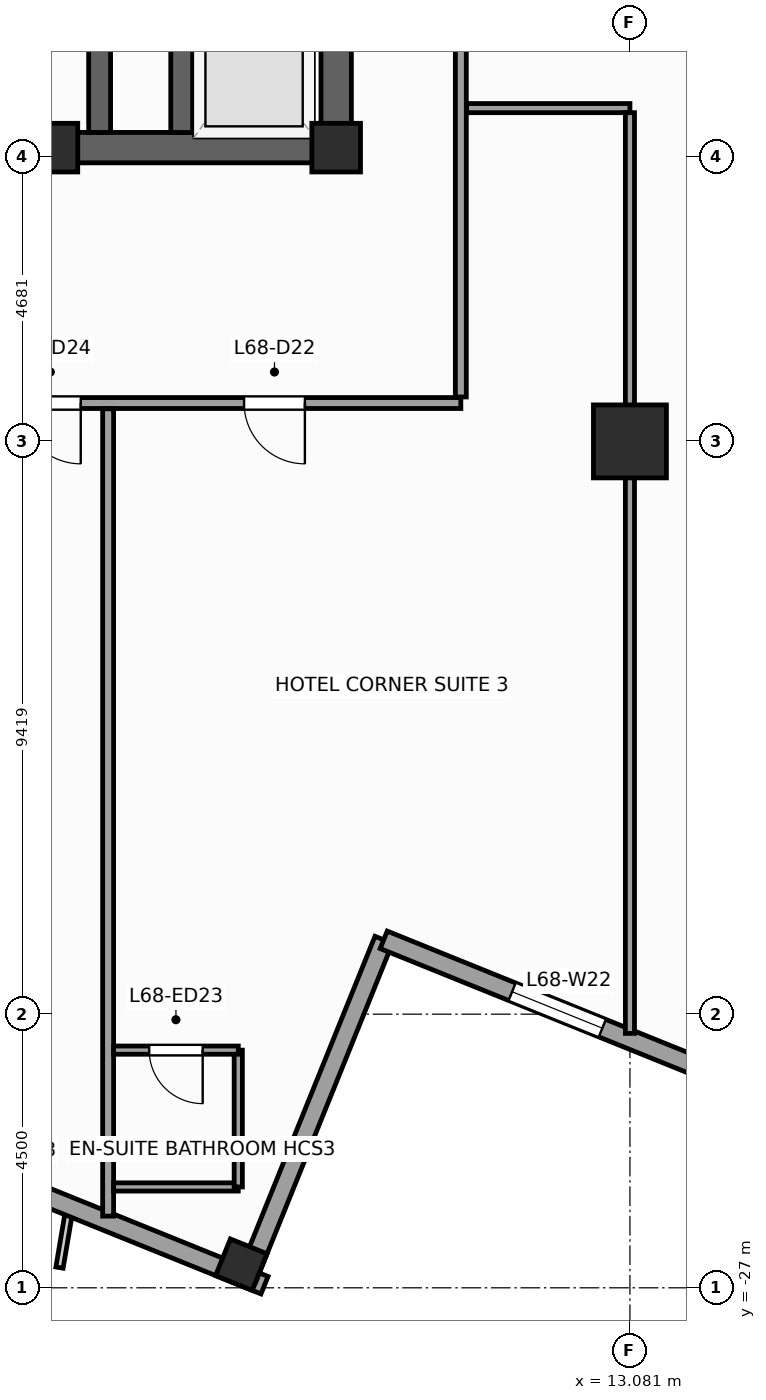
"""IFC4 building model, lengths in metres.
Left out: names, types, materials, properties, quantities, classifications, styles, units other than length and angle.
Written with IfcOpenShell. Run it as: python <this file> out.ifc"""

import sys

from ifc_helpers import new_model, si_unit, direction, frame, frame_2d, origin, origin_2d, place, context, subcontext, project, spatial, rectangle, extrude, source, transform, mapped, element, fill, save


model = new_model("IFC4")
c1 = context("Model", 3, precision=1e-05, world=origin(), true_north=direction((0.0, 1.0)))
c2 = subcontext(c1, "Body", "Model", "MODEL_VIEW")
j1 = project(units=[si_unit("LENGTHUNIT", "METRE"), si_unit("PLANEANGLEUNIT", "RADIAN")], contexts=[c1])
p1 = place(None, origin())
s1 = spatial("IfcSite", under=j1, at=p1, CompositionType="ELEMENT")
p2 = place(p1, origin())
s2 = spatial("IfcBuilding", under=s1, at=p2, CompositionType="ELEMENT")
p3 = place(p2, frame((0.0, 0.0, 279.6)))
s3 = spatial("IfcBuildingStorey", under=s2, at=p3, CompositionType="ELEMENT", Elevation=279.6)
p4 = place(p3, frame((-8.5, -8.25, 0.0), z_axis=(0.0, 0.0, 1.0), x_axis=(1.0, 0.0, 0.0)))
e1 = element("IfcWall", 1, at=p4, inside=s3, PredefinedType="SHEAR", context=c2, shape_type="SweptSolid", body=[
    extrude(rectangle(XDim=17.0, YDim=0.5, at=frame_2d((8.5, 0.0))), origin(), (0.0, 0.0, 1.0), 3.6),
])
p5 = place(p4, frame((7.85, 0.0, 0.0)))
e2 = element("IfcOpeningElement", 2, at=p5, cuts=e1, PredefinedType="OPENING", context=c2, shape_type="SweptSolid", body=[
    extrude(rectangle(XDim=1.3, YDim=2.2, at=frame_2d((0.65, 1.1))), frame((0.0, 0.26, 0.0), z_axis=(0.0, -1.0, 0.0), x_axis=(1.0, 0.0, 0.0)), (0.0, 0.0, 1.0), 0.52),
])
p6 = place(p3, frame((8.25, -8.0, 0.0), z_axis=(0.0, 0.0, 1.0), x_axis=(0.0, 1.0, 0.0)))
e3 = element("IfcWall", 3, at=p6, inside=s3, PredefinedType="SHEAR", context=c2, shape_type="SweptSolid", body=[
    extrude(rectangle(XDim=16.0, YDim=0.5, at=frame_2d((8.0, 0.0))), origin(), (0.0, 0.0, 1.0), 3.6),
])
p7 = place(p6, frame((4.69, 0.0, 0.0)))
e4 = element("IfcOpeningElement", 4, at=p7, cuts=e3, PredefinedType="OPENING", context=c2, shape_type="SweptSolid", body=[
    extrude(rectangle(XDim=1.3, YDim=2.2, at=frame_2d((0.65, 1.1))), frame((0.0, 0.26, 0.0), z_axis=(0.0, -1.0, 0.0), x_axis=(1.0, 0.0, 0.0)), (0.0, 0.0, 1.0), 0.52),
])
p8 = place(p3, frame((4.36, -8.0, 0.0), z_axis=(0.0, 0.0, 1.0), x_axis=(0.0, 1.0, 0.0)))
e5 = element("IfcWall", 5, at=p8, inside=s3, PredefinedType="SHEAR", context=c2, shape_type="SweptSolid", body=[
    extrude(rectangle(XDim=16.0, YDim=0.36, at=frame_2d((8.0, 0.0))), origin(), (0.0, 0.0, 1.0), 3.6),
])
p9 = place(p3, frame((5.71, -8.0, 0.0), z_axis=(0.0, 0.0, 1.0), x_axis=(0.0, 1.0, 0.0)))
e6 = element("IfcWall", 6, at=p9, inside=s3, PredefinedType="SHEAR", context=c2, shape_type="SweptSolid", body=[
    extrude(rectangle(XDim=2.54, YDim=0.36, at=frame_2d((1.27, 0.0))), origin(), (0.0, 0.0, 1.0), 3.6),
])
m1 = source(origin(), c2, "Body", "SweptSolid", [
    extrude(rectangle(XDim=0.8, YDim=0.8, at=origin_2d()), origin(), (0.0, 0.0, 1.0), 3.6),
])
for number, where, z_axis, x_axis in (
    (7, (8.25, -8.25, 0.0), (0.0, 0.0, 1.0), (1.0, 0.0, 0.0)),
    (8, (3.6, -8.25, 0.0), (0.0, 0.0, 1.0), (1.0, 0.0, 0.0)),
):
    element("IfcColumn", number, at=place(p3, frame(where, z_axis=z_axis, x_axis=x_axis)), inside=s3, PredefinedType="PILASTER", context=c2, shape_type="MappedRepresentation", body=[
        mapped(m1, transform((0.0, 0.0, 0.0), scale=1.0)),
    ])
m2 = source(origin(), c2, "Body", "SweptSolid", [
    extrude(rectangle(XDim=1.2, YDim=1.2, at=origin_2d()), origin(), (0.0, 0.0, 1.0), 3.6),
])
p10 = place(p3, frame((13.081, -13.081, 0.0), z_axis=(0.0, 0.0, 1.0), x_axis=(1.0, 0.0, 0.0)))
e9 = element("IfcColumn", 9, at=p10, inside=s3, PredefinedType="COLUMN", context=c2, shape_type="MappedRepresentation", body=[
    mapped(m2, transform((0.0, 0.0, 0.0), scale=1.0)),
])
m3 = source(origin(), c2, "Body", "SweptSolid", [
    extrude(rectangle(XDim=0.65, YDim=0.65, at=origin_2d()), origin(), (0.0, 0.0, 1.0), 3.6),
])
p11 = place(p3, frame((6.69, -26.62, 0.0), z_axis=(0.0, 0.0, 1.0), x_axis=(0.374606593416, 0.927183854567, 0.0)))
e10 = element("IfcColumn", 10, at=p11, inside=s3, PredefinedType="COLUMN", context=c2, shape_type="MappedRepresentation", body=[
    mapped(m3, transform((0.0, 0.0, 0.0), scale=1.0)),
])
p12 = place(p3, frame((-23.813, -14.479, 0.0), z_axis=(0.0, 0.0, 1.0), x_axis=(0.927182657188, -0.374609557019, 0.0)))
e11 = element("IfcWall", 11, at=p12, inside=s3, PredefinedType="STANDARD", context=c2, shape_type="SweptSolid", body=[
    extrude(rectangle(XDim=33.31, YDim=0.31, at=frame_2d((16.655, 0.0))), origin(), (0.0, 0.0, 1.0), 2.75),
])
p13 = place(p12, frame((3.197, 0.0, 0.47)))
e12 = element("IfcOpeningElement", 12, at=p13, cuts=e11, PredefinedType="OPENING", context=c2, shape_type="SweptSolid", body=[
    extrude(rectangle(XDim=1.6, YDim=2.1, at=frame_2d((0.8, 1.05))), frame((0.0, 0.165, 0.0), z_axis=(0.0, -1.0, 0.0), x_axis=(1.0, 0.0, 0.0)), (0.0, 0.0, 1.0), 0.33),
])
p14 = place(p12, frame((8.86, 0.0, 0.47)))
e13 = element("IfcOpeningElement", 13, at=p14, cuts=e11, PredefinedType="OPENING", context=c2, shape_type="SweptSolid", body=[
    extrude(rectangle(XDim=1.6, YDim=2.1, at=frame_2d((0.8, 1.05))), frame((0.0, 0.165, 0.0), z_axis=(0.0, -1.0, 0.0), x_axis=(1.0, 0.0, 0.0)), (0.0, 0.0, 1.0), 0.33),
])
p15 = place(p12, frame((14.439, 0.0, 0.47)))
e14 = element("IfcOpeningElement", 14, at=p15, cuts=e11, PredefinedType="OPENING", context=c2, shape_type="SweptSolid", body=[
    extrude(rectangle(XDim=1.6, YDim=2.1, at=frame_2d((0.8, 1.05))), frame((0.0, 0.165, 0.0), z_axis=(0.0, -1.0, 0.0), x_axis=(1.0, 0.0, 0.0)), (0.0, 0.0, 1.0), 0.33),
])
p16 = place(p12, frame((21.851, 0.0, 0.47)))
e15 = element("IfcOpeningElement", 15, at=p16, cuts=e11, PredefinedType="OPENING", context=c2, shape_type="SweptSolid", body=[
    extrude(rectangle(XDim=1.6, YDim=2.1, at=frame_2d((0.8, 1.05))), frame((0.0, 0.165, 0.0), z_axis=(0.0, -1.0, 0.0), x_axis=(1.0, 0.0, 0.0)), (0.0, 0.0, 1.0), 0.33),
])
p17 = place(p12, frame((27.847, 0.0, 0.47)))
e16 = element("IfcOpeningElement", 16, at=p17, cuts=e11, PredefinedType="OPENING", context=c2, shape_type="SweptSolid", body=[
    extrude(rectangle(XDim=1.6, YDim=2.1, at=frame_2d((0.8, 1.05))), frame((0.0, 0.165, 0.0), z_axis=(0.0, -1.0, 0.0), x_axis=(1.0, 0.0, 0.0)), (0.0, 0.0, 1.0), 0.33),
])
p18 = place(p3, frame((6.784, -26.841, 0.0), z_axis=(0.0, 0.0, 1.0), x_axis=(0.374636620962, 0.927171722085, 0.0)))
e17 = element("IfcWall", 17, at=p18, inside=s3, PredefinedType="STANDARD", context=c2, shape_type="SweptSolid", body=[
    extrude(rectangle(XDim=6.0, YDim=0.31, at=frame_2d((3.0, 0.0))), origin(), (0.0, 0.0, 1.0), 2.65),
])
p19 = place(p3, frame((9.032, -21.278, 0.0), z_axis=(0.0, 0.0, 1.0), x_axis=(0.927185411764, -0.374602739196, 0.0)))
e18 = element("IfcWall", 18, at=p19, inside=s3, PredefinedType="STANDARD", context=c2, shape_type="SweptSolid", body=[
    extrude(rectangle(XDim=6.155, YDim=0.31, at=frame_2d((3.078, 0.0))), origin(), (0.0, 0.0, 1.0), 3.35),
])
p20 = place(p19, frame((2.278, 0.0, 0.47)))
e19 = element("IfcOpeningElement", 19, at=p20, cuts=e18, PredefinedType="OPENING", context=c2, shape_type="SweptSolid", body=[
    extrude(rectangle(XDim=1.6, YDim=2.1, at=frame_2d((0.8, 1.05))), frame((0.0, 0.165, 0.0), z_axis=(0.0, -1.0, 0.0), x_axis=(1.0, 0.0, 0.0)), (0.0, 0.0, 1.0), 0.33),
])
p21 = place(p3, frame((-11.45, -12.45, 0.0), z_axis=(0.0, 0.0, 1.0), x_axis=(1.0, 0.0, 0.0)))
e20 = element("IfcWall", 20, at=p21, inside=s3, PredefinedType="PARTITIONING", context=c2, shape_type="SweptSolid", body=[
    extrude(rectangle(XDim=21.75, YDim=0.18, at=frame_2d((10.875, 0.0))), origin(), (0.0, 0.0, 1.0), 3.35),
])
p22 = place(p21, frame((12.436, 0.0, 0.0)))
e21 = element("IfcOpeningElement", 21, at=p22, cuts=e20, PredefinedType="OPENING", context=c2, shape_type="SweptSolid", body=[
    extrude(rectangle(XDim=0.95, YDim=2.1, at=frame_2d((0.475, 1.05))), frame((0.0, 0.1, 0.0), z_axis=(0.0, -1.0, 0.0), x_axis=(1.0, 0.0, 0.0)), (0.0, 0.0, 1.0), 0.2),
])
p23 = place(p21, frame((18.186, 0.0, 0.0)))
e22 = element("IfcOpeningElement", 22, at=p23, cuts=e20, PredefinedType="OPENING", context=c2, shape_type="SweptSolid", body=[
    extrude(rectangle(XDim=1.0, YDim=2.15, at=frame_2d((0.5, 1.075))), frame((0.0, 0.1, 0.0), z_axis=(0.0, -1.0, 0.0), x_axis=(1.0, 0.0, 0.0)), (0.0, 0.0, 1.0), 0.2),
])
p24 = place(p21, frame((14.5, 0.0, 0.0)))
e23 = element("IfcOpeningElement", 23, at=p24, cuts=e20, PredefinedType="OPENING", context=c2, shape_type="SweptSolid", body=[
    extrude(rectangle(XDim=1.0, YDim=2.15, at=frame_2d((0.5, 1.075))), frame((0.0, 0.1, 0.0), z_axis=(0.0, -1.0, 0.0), x_axis=(1.0, 0.0, 0.0)), (0.0, 0.0, 1.0), 0.2),
])
p25 = place(p21, frame((8.7, 0.0, 0.0)))
e24 = element("IfcOpeningElement", 24, at=p25, cuts=e20, PredefinedType="OPENING", context=c2, shape_type="SweptSolid", body=[
    extrude(rectangle(XDim=1.0, YDim=2.15, at=frame_2d((0.5, 1.075))), frame((0.0, 0.1, 0.0), z_axis=(0.0, -1.0, 0.0), x_axis=(1.0, 0.0, 0.0)), (0.0, 0.0, 1.0), 0.2),
])
p26 = place(p21, frame((3.139, 0.0, 0.0)))
e25 = element("IfcOpeningElement", 25, at=p26, cuts=e20, PredefinedType="OPENING", context=c2, shape_type="SweptSolid", body=[
    extrude(rectangle(XDim=1.0, YDim=2.15, at=frame_2d((0.5, 1.075))), frame((0.0, 0.1, 0.0), z_axis=(0.0, -1.0, 0.0), x_axis=(1.0, 0.0, 0.0)), (0.0, 0.0, 1.0), 0.2),
])
p27 = place(p3, frame((10.3, -12.35, 0.0), z_axis=(0.0, 0.0, 1.0), x_axis=(0.0, 1.0, 0.0)))
e26 = element("IfcWall", 26, at=p27, inside=s3, PredefinedType="PARTITIONING", context=c2, shape_type="SweptSolid", body=[
    extrude(rectangle(XDim=23.7, YDim=0.18, at=frame_2d((11.85, 0.0))), origin(), (0.0, 0.0, 1.0), 3.35),
])
p28 = place(p27, frame((17.65, 0.0, 0.0)))
e27 = element("IfcOpeningElement", 27, at=p28, cuts=e26, PredefinedType="OPENING", context=c2, shape_type="SweptSolid", body=[
    extrude(rectangle(XDim=1.0, YDim=2.15, at=frame_2d((0.5, 1.075))), frame((0.0, 0.1, 0.0), z_axis=(0.0, -1.0, 0.0), x_axis=(1.0, 0.0, 0.0)), (0.0, 0.0, 1.0), 0.2),
])
p29 = place(p27, frame((13.85, 0.0, 0.0)))
e28 = element("IfcOpeningElement", 28, at=p29, cuts=e26, PredefinedType="OPENING", context=c2, shape_type="SweptSolid", body=[
    extrude(rectangle(XDim=1.0, YDim=2.15, at=frame_2d((0.5, 1.075))), frame((0.0, 0.1, 0.0), z_axis=(0.0, -1.0, 0.0), x_axis=(1.0, 0.0, 0.0)), (0.0, 0.0, 1.0), 0.2),
])
p30 = place(p27, frame((9.85, 0.0, 0.0)))
e29 = element("IfcOpeningElement", 29, at=p30, cuts=e26, PredefinedType="OPENING", context=c2, shape_type="SweptSolid", body=[
    extrude(rectangle(XDim=1.0, YDim=2.15, at=frame_2d((0.5, 1.075))), frame((0.0, 0.1, 0.0), z_axis=(0.0, -1.0, 0.0), x_axis=(1.0, 0.0, 0.0)), (0.0, 0.0, 1.0), 0.2),
])
p31 = place(p27, frame((6.05, 0.0, 0.0)))
e30 = element("IfcOpeningElement", 30, at=p31, cuts=e26, PredefinedType="OPENING", context=c2, shape_type="SweptSolid", body=[
    extrude(rectangle(XDim=1.0, YDim=2.15, at=frame_2d((0.5, 1.075))), frame((0.0, 0.1, 0.0), z_axis=(0.0, -1.0, 0.0), x_axis=(1.0, 0.0, 0.0)), (0.0, 0.0, 1.0), 0.2),
])
p32 = place(p3, frame((4.5, -12.545, 0.0), z_axis=(0.0, 0.0, 1.0), x_axis=(0.0, -1.0, 0.0)))
e31 = element("IfcWall", 31, at=p32, inside=s3, PredefinedType="PARTITIONING", context=c2, shape_type="SweptSolid", body=[
    extrude(rectangle(XDim=13.276, YDim=0.18, at=frame_2d((6.638, 0.0))), origin(), (0.0, 0.0, 1.0), 3.35),
])
p33 = place(p3, frame((10.395, -7.6, 0.0), z_axis=(0.0, 0.0, 1.0), x_axis=(1.0, 0.0, 0.0)))
e32 = element("IfcWall", 32, at=p33, inside=s3, PredefinedType="PARTITIONING", context=c2, shape_type="SweptSolid", body=[
    extrude(rectangle(XDim=2.686, YDim=0.15, at=frame_2d((1.343, 0.0))), origin(), (0.0, 0.0, 1.0), 3.35),
])
p34 = place(p3, frame((13.081, -7.675, 0.0), z_axis=(0.0, 0.0, 1.0), x_axis=(0.0, -1.0, 0.0)))
e33 = element("IfcWall", 33, at=p34, inside=s3, PredefinedType="PARTITIONING", context=c2, shape_type="SweptSolid", body=[
    extrude(rectangle(XDim=15.142, YDim=0.15, at=frame_2d((7.571, 0.0))), origin(), (0.0, 0.0, 1.0), 2.45),
])
p35 = place(p3, frame((4.59, -25.342, 0.0), z_axis=(0.0, 0.0, 1.0), x_axis=(1.0, 0.0, 0.0)))
e34 = element("IfcWall", 34, at=p35, inside=s3, PredefinedType="PARTITIONING", context=c2, shape_type="SweptSolid", body=[
    extrude(rectangle(XDim=2.05, YDim=0.135, at=frame_2d((1.025, 0.0))), origin(), (0.0, 0.0, 1.0), 3.35),
])
p36 = place(p3, frame((6.64, -25.342, 0.0), z_axis=(0.0, 0.0, 1.0), x_axis=(0.0, 1.0, 0.0)))
e35 = element("IfcWall", 35, at=p36, inside=s3, PredefinedType="PARTITIONING", context=c2, shape_type="SweptSolid", body=[
    extrude(rectangle(XDim=2.25, YDim=0.135, at=frame_2d((1.125, 0.0))), origin(), (0.0, 0.0, 1.0), 3.35),
])
p37 = place(p3, frame((4.59, -23.092, 0.0), z_axis=(0.0, 0.0, 1.0), x_axis=(1.0, 0.0, 0.0)))
e36 = element("IfcWall", 36, at=p37, inside=s3, PredefinedType="PARTITIONING", context=c2, shape_type="SweptSolid", body=[
    extrude(rectangle(XDim=2.05, YDim=0.135, at=frame_2d((1.025, 0.0))), origin(), (0.0, 0.0, 1.0), 3.35),
])
p38 = place(p37, frame((0.585, 0.0, 0.0)))
e37 = element("IfcOpeningElement", 37, at=p38, cuts=e36, PredefinedType="OPENING", context=c2, shape_type="SweptSolid", body=[
    extrude(rectangle(XDim=0.88, YDim=2.1, at=frame_2d((0.44, 1.05))), frame((0.0, 0.078, 0.0), z_axis=(0.0, -1.0, 0.0), x_axis=(1.0, 0.0, 0.0)), (0.0, 0.0, 1.0), 0.155),
])
m4 = source(origin(), c2, "Body", "SweptSolid", [
    extrude(rectangle(XDim=1.6, YDim=2.1, at=frame_2d((0.8, 1.05))), frame((0.0, 0.03, 0.0), z_axis=(0.0, -1.0, 0.0), x_axis=(1.0, 0.0, 0.0)), (0.0, 0.0, 1.0), 0.06),
])
p39 = place(p20, origin())
e38 = element("IfcWindow", 38, at=p39, inside=s3, PartitioningType="SINGLE_PANEL", PredefinedType="WINDOW", context=c2, shape_type="MappedRepresentation", body=[
    mapped(m4, transform((0.0, 0.0, 0.0), scale=1.0)),
])
fill(e19, e38)
m5 = source(origin(), c2, "Body", "SweptSolid", [
    extrude(rectangle(XDim=1.0, YDim=2.15, at=frame_2d((0.5, 1.075))), frame((0.0, 0.025, 0.0), z_axis=(0.0, -1.0, 0.0), x_axis=(1.0, 0.0, 0.0)), (0.0, 0.0, 1.0), 0.05),
])
p40 = place(p23, frame((1.0, 0.0, 0.0), z_axis=(0.0, 0.0, 1.0), x_axis=(-1.0, 0.0, 0.0)))
e39 = element("IfcDoor", 39, at=p40, inside=s3, OperationType="SINGLE_SWING_RIGHT", PredefinedType="DOOR", context=c2, shape_type="MappedRepresentation", body=[
    mapped(m5, transform((0.0, 0.0, 0.0), scale=1.0)),
])
fill(e22, e39)
m6 = source(origin(), c2, "Body", "SweptSolid", [
    extrude(rectangle(XDim=0.88, YDim=2.1, at=frame_2d((0.44, 1.05))), frame((0.0, 0.025, 0.0), z_axis=(0.0, -1.0, 0.0), x_axis=(1.0, 0.0, 0.0)), (0.0, 0.0, 1.0), 0.05),
])
p41 = place(p38, frame((0.88, 0.0, 0.0), z_axis=(0.0, 0.0, 1.0), x_axis=(-1.0, 0.0, 0.0)))
e40 = element("IfcDoor", 40, at=p41, inside=s3, OperationType="SINGLE_SWING_RIGHT", PredefinedType="DOOR", context=c2, shape_type="MappedRepresentation", body=[
    mapped(m6, transform((0.0, 0.0, 0.0), scale=1.0)),
])
fill(e37, e40)
p42 = place(p24, frame((1.0, 0.0, 0.0), z_axis=(0.0, 0.0, 1.0), x_axis=(-1.0, 0.0, 0.0)))
e41 = element("IfcDoor", 41, at=p42, inside=s3, OperationType="SINGLE_SWING_RIGHT", PredefinedType="DOOR", context=c2, shape_type="MappedRepresentation", body=[
    mapped(m5, transform((0.0, 0.0, 0.0), scale=1.0)),
])
fill(e23, e41)
save(model, sys.argv[1])
